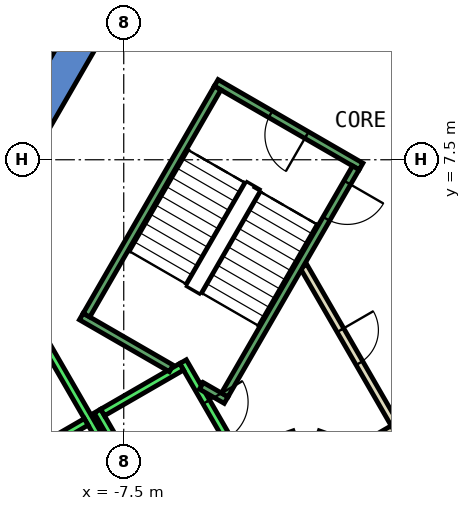
"""IFC4 building model, lengths in metres.
Left out: names, types, materials, properties, quantities, classifications, styles, units other than length and angle.
Written with IfcOpenShell. Run it as: python <this file> out.ifc"""

import sys

from ifc_helpers import new_model, si_unit, direction, frame, frame_2d, origin, place, context, subcontext, project, spatial, polyline, rectangle, outline, extrude, element, fill, save


model = new_model("IFC4")
c1 = context("Model", 3, precision=1e-05, world=origin(), true_north=direction((0.0, 1.0)))
c2 = subcontext(c1, "Body", "Model", "MODEL_VIEW")
j1 = project(units=[si_unit("LENGTHUNIT", "METRE"), si_unit("PLANEANGLEUNIT", "RADIAN")], contexts=[c1])
p1 = place(None, origin())
s1 = spatial("IfcSite", under=j1, at=p1, CompositionType="ELEMENT")
p2 = place(p1, origin())
s2 = spatial("IfcBuilding", under=s1, at=p2, CompositionType="ELEMENT")
p3 = place(p2, frame((0.0, 0.0, 90.8)))
s3 = spatial("IfcBuildingStorey", under=s2, at=p3, CompositionType="ELEMENT", Elevation=90.8)
p4 = place(p3, frame((0.0, 0.0, -0.4)))
e1 = element("IfcWall", 1, at=p4, inside=s3, PredefinedType="SHEAR", context=c2, shape_type="SweptSolid", body=[
    extrude(outline(polyline([(-12.267, 5.252), (-11.488, 4.802), (-6.409, 13.6), (-6.928, 14.5), (-12.267, 5.252)])), origin(), (0.0, 0.0, 1.0), 4.2),
])
p5 = place(p3, frame((0.0, 0.0, -0.4)))
e2 = element("IfcWall", 2, at=p5, inside=s3, PredefinedType="SHEAR", context=c2, shape_type="SweptSolid", body=[
    extrude(outline(polyline([(-13.856, 2.5), (-6.928, -9.5), (-6.409, -8.6), (-12.817, 2.5), (-13.856, 2.5)])), origin(), (0.0, 0.0, 1.0), 4.2),
])
p6 = place(p3, frame((-0.52, -1.0, 0.0), z_axis=(0.0, 0.0, 1.0), x_axis=(0.50011622646, 0.865958290007, 0.0)))
e3 = element("IfcWall", 3, at=p6, inside=s3, PredefinedType="PARTITIONING", context=c2, shape_type="SweptSolid", body=[
    extrude(rectangle(XDim=4.991, YDim=0.2, at=frame_2d((2.496, 0.0))), origin(), (0.0, 0.0, 1.0), 3.8),
])
p7 = place(p6, frame((1.945, 0.0, 0.0)))
e4 = element("IfcOpeningElement", 4, at=p7, cuts=e3, PredefinedType="OPENING", context=c2, shape_type="SweptSolid", body=[
    extrude(rectangle(XDim=1.0, YDim=2.1, at=frame_2d((0.5, 1.05))), frame((0.0, 0.11, 0.0), z_axis=(0.0, -1.0, 0.0), x_axis=(1.0, 0.0, 0.0)), (0.0, 0.0, 1.0), 0.22),
])
p8 = place(p3, frame((-2.771, 4.7, 0.0), z_axis=(0.0, 0.0, 1.0), x_axis=(0.499969479948, -0.866043023828, 0.0)))
e5 = element("IfcWall", 5, at=p8, inside=s3, PredefinedType="PARTITIONING", context=c2, shape_type="SweptSolid", body=[
    extrude(rectangle(XDim=4.99, YDim=0.2, at=frame_2d((2.495, 0.0))), origin(), (0.0, 0.0, 1.0), 3.8),
])
p9 = place(p8, frame((1.945, 0.0, 0.0)))
e6 = element("IfcOpeningElement", 6, at=p9, cuts=e5, PredefinedType="OPENING", context=c2, shape_type="SweptSolid", body=[
    extrude(rectangle(XDim=1.0, YDim=2.1, at=frame_2d((0.5, 1.05))), frame((0.0, 0.11, 0.0), z_axis=(0.0, -1.0, 0.0), x_axis=(1.0, 0.0, 0.0)), (0.0, 0.0, 1.0), 0.22),
])
p10 = place(p3, frame((-0.412, 0.414, 0.0), z_axis=(0.0, 0.0, 1.0), x_axis=(-0.866017369001, -0.500013916395, 0.0)))
e7 = element("IfcWall", 7, at=p10, inside=s3, PredefinedType="PARTITIONING", context=c2, shape_type="SweptSolid", body=[
    extrude(rectangle(XDim=1.45, YDim=0.2, at=frame_2d((0.725, 0.0))), origin(), (0.0, 0.0, 1.0), 3.8),
])
p11 = place(p3, frame((-2.07, 0.16, 0.0), z_axis=(0.0, 0.0, 1.0), x_axis=(-0.942199461132, 0.335052496547, 0.0)))
e8 = element("IfcWall", 8, at=p11, inside=s3, PredefinedType="PARTITIONING", context=c2, shape_type="SweptSolid", body=[
    extrude(rectangle(XDim=0.337, YDim=0.2, at=frame_2d((0.169, 0.0))), origin(), (0.0, 0.0, 1.0), 3.8),
])
p12 = place(p3, frame((-3.012, 0.273, 0.0), z_axis=(0.0, 0.0, 1.0), x_axis=(-0.942280615813, -0.334824194261, 0.0)))
e9 = element("IfcWall", 9, at=p12, inside=s3, PredefinedType="PARTITIONING", context=c2, shape_type="SweptSolid", body=[
    extrude(rectangle(XDim=0.338, YDim=0.2, at=frame_2d((0.169, 0.0))), origin(), (0.0, 0.0, 1.0), 3.8),
])
p13 = place(p3, frame((-5.94, 2.188, 0.0), z_axis=(0.0, 0.0, 1.0), x_axis=(0.49994636267, -0.866056369097, 0.0)))
e10 = element("IfcWall", 10, at=p13, inside=s3, PredefinedType="STANDARD", context=c2, shape_type="SweptSolid", body=[
    extrude(rectangle(XDim=2.8, YDim=0.2, at=frame_2d((1.4, 0.0))), origin(), (0.0, 0.0, 1.0), 3.8),
])
p14 = place(p13, frame((1.225, 0.0, 0.0)))
e11 = element("IfcOpeningElement", 11, at=p14, cuts=e10, PredefinedType="OPENING", context=c2, shape_type="SweptSolid", body=[
    extrude(rectangle(XDim=1.1, YDim=2.1, at=frame_2d((0.55, 1.05))), frame((0.0, 0.11, 0.0), z_axis=(0.0, -1.0, 0.0), x_axis=(1.0, 0.0, 0.0)), (0.0, 0.0, 1.0), 0.22),
])
p15 = place(p3, frame((-8.192, 0.888, 0.0), z_axis=(0.0, 0.0, 1.0), x_axis=(0.49994636267, -0.866056369097, 0.0)))
e12 = element("IfcWall", 12, at=p15, inside=s3, PredefinedType="STANDARD", context=c2, shape_type="SweptSolid", body=[
    extrude(rectangle(XDim=2.8, YDim=0.2, at=frame_2d((1.4, 0.0))), origin(), (0.0, 0.0, 1.0), 3.8),
])
p16 = place(p3, frame((-5.977, 2.052, 0.0), z_axis=(0.0, 0.0, 1.0), x_axis=(-0.865973769406, -0.500089422704, 0.0)))
e13 = element("IfcWall", 13, at=p16, inside=s3, PredefinedType="STANDARD", context=c2, shape_type="SweptSolid", body=[
    extrude(rectangle(XDim=2.399, YDim=0.2, at=frame_2d((1.2, 0.0))), origin(), (0.0, 0.0, 1.0), 3.8),
])
p17 = place(p3, frame((-9.751, 2.99, 0.0), z_axis=(0.0, 0.0, 1.0), x_axis=(0.50000090737, -0.866024879913, 0.0)))
e14 = element("IfcWall", 14, at=p17, inside=s3, PredefinedType="STANDARD", context=c2, shape_type="SweptSolid", body=[
    extrude(rectangle(XDim=10.6, YDim=0.2, at=frame_2d((5.3, 0.0))), origin(), (0.0, 0.0, 1.0), 3.8),
])
p18 = place(p3, frame((-8.488, 0.602, 0.0), z_axis=(0.0, 0.0, 1.0), x_axis=(-0.866022959057, -0.500004234368, 0.0)))
e15 = element("IfcWall", 15, at=p18, inside=s3, PredefinedType="STANDARD", context=c2, shape_type="SweptSolid", body=[
    extrude(rectangle(XDim=2.5, YDim=0.2, at=frame_2d((1.25, 0.0))), origin(), (0.0, 0.0, 1.0), 3.8),
])
p19 = place(p3, frame((-1.256, 7.324, 0.0), z_axis=(0.0, 0.0, 1.0), x_axis=(-0.866046073146, 0.499964197906, 0.0)))
e16 = element("IfcWall", 16, at=p19, inside=s3, PredefinedType="STANDARD", context=c2, shape_type="SweptSolid", body=[
    extrude(rectangle(XDim=4.4, YDim=0.2, at=frame_2d((2.2, 0.0))), origin(), (0.0, 0.0, 1.0), 3.8),
])
p20 = place(p19, frame((1.65, 0.0, 0.0)))
e17 = element("IfcOpeningElement", 17, at=p20, cuts=e16, PredefinedType="OPENING", context=c2, shape_type="SweptSolid", body=[
    extrude(rectangle(XDim=1.1, YDim=2.2, at=frame_2d((0.55, 1.1))), frame((0.0, 0.11, 0.0), z_axis=(0.0, -1.0, 0.0), x_axis=(1.0, 0.0, 0.0)), (0.0, 0.0, 1.0), 0.22),
])
p21 = place(p3, frame((-6.25, 2.01, 0.0), z_axis=(0.0, 0.0, 1.0), x_axis=(-0.86611865017, 0.499838457731, 0.0)))
e18 = element("IfcWall", 18, at=p21, inside=s3, PredefinedType="STANDARD", context=c2, shape_type="SweptSolid", body=[
    extrude(rectangle(XDim=2.733, YDim=0.2, at=frame_2d((1.366, 0.0))), origin(), (0.0, 0.0, 1.0), 3.8),
])
p22 = place(p3, frame((-4.806, 1.176, 0.0), z_axis=(0.0, 0.0, 1.0), x_axis=(-0.866558586415, 0.499075361355, 0.0)))
e19 = element("IfcWall", 19, at=p22, inside=s3, PredefinedType="STANDARD", context=c2, shape_type="SweptSolid", body=[
    extrude(rectangle(XDim=0.751, YDim=0.2, at=frame_2d((0.376, 0.0))), origin(), (0.0, 0.0, 1.0), 3.8),
])
p23 = place(p3, frame((-1.393, 7.288, 0.0), z_axis=(0.0, 0.0, 1.0), x_axis=(-0.499963383562, -0.866046543262, 0.0)))
e20 = element("IfcWall", 20, at=p23, inside=s3, PredefinedType="STANDARD", context=c2, shape_type="SweptSolid", body=[
    extrude(rectangle(XDim=6.9, YDim=0.2, at=frame_2d((3.45, 0.0))), origin(), (0.0, 0.0, 1.0), 3.8),
])
p24 = place(p23, frame((0.45, 0.0, 0.0)))
e21 = element("IfcOpeningElement", 21, at=p24, cuts=e20, PredefinedType="OPENING", context=c2, shape_type="SweptSolid", body=[
    extrude(rectangle(XDim=1.1, YDim=2.2, at=frame_2d((0.55, 1.1))), frame((0.0, 0.11, 0.0), z_axis=(0.0, -1.0, 0.0), x_axis=(1.0, 0.0, 0.0)), (0.0, 0.0, 1.0), 0.22),
])
p25 = place(p3, frame((-5.03, 9.388, 0.0), z_axis=(0.0, 0.0, 1.0), x_axis=(-0.499978703459, -0.866037698999, 0.0)))
e22 = element("IfcWall", 22, at=p25, inside=s3, PredefinedType="STANDARD", context=c2, shape_type="SweptSolid", body=[
    extrude(rectangle(XDim=6.9, YDim=0.2, at=frame_2d((3.45, 0.0))), origin(), (0.0, 0.0, 1.0), 3.8),
])
p26 = place(p9, origin())
e23 = element("IfcDoor", 23, at=p26, inside=s3, OperationType="SINGLE_SWING_RIGHT", PredefinedType="DOOR", context=c2, shape_type="SweptSolid", body=[
    extrude(rectangle(XDim=1.0, YDim=2.1, at=frame_2d((0.5, 1.05))), frame((0.0, 0.025, 0.0), z_axis=(0.0, -1.0, 0.0), x_axis=(1.0, 0.0, 0.0)), (0.0, 0.0, 1.0), 0.05),
])
fill(e6, e23)
p27 = place(p14, origin())
e24 = element("IfcDoor", 24, at=p27, inside=s3, OperationType="SLIDING_TO_LEFT", PredefinedType="DOOR", context=c2, shape_type="SweptSolid", body=[
    extrude(rectangle(XDim=1.1, YDim=2.1, at=frame_2d((0.55, 1.05))), frame((0.0, 0.025, 0.0), z_axis=(0.0, -1.0, 0.0), x_axis=(1.0, 0.0, 0.0)), (0.0, 0.0, 1.0), 0.05),
])
fill(e11, e24)
p28 = place(p24, origin())
e25 = element("IfcDoor", 25, at=p28, inside=s3, OperationType="SINGLE_SWING_LEFT", PredefinedType="DOOR", context=c2, shape_type="SweptSolid", body=[
    extrude(rectangle(XDim=1.1, YDim=2.2, at=frame_2d((0.55, 1.1))), frame((0.0, 0.025, 0.0), z_axis=(0.0, -1.0, 0.0), x_axis=(1.0, 0.0, 0.0)), (0.0, 0.0, 1.0), 0.05),
])
fill(e21, e25)
p29 = place(p20, origin())
e26 = element("IfcDoor", 26, at=p29, inside=s3, OperationType="SINGLE_SWING_LEFT", PredefinedType="DOOR", context=c2, shape_type="SweptSolid", body=[
    extrude(rectangle(XDim=1.1, YDim=2.2, at=frame_2d((0.55, 1.1))), frame((0.0, 0.025, 0.0), z_axis=(0.0, -1.0, 0.0), x_axis=(1.0, 0.0, 0.0)), (0.0, 0.0, 1.0), 0.05),
])
fill(e17, e26)
save(model, sys.argv[1])
